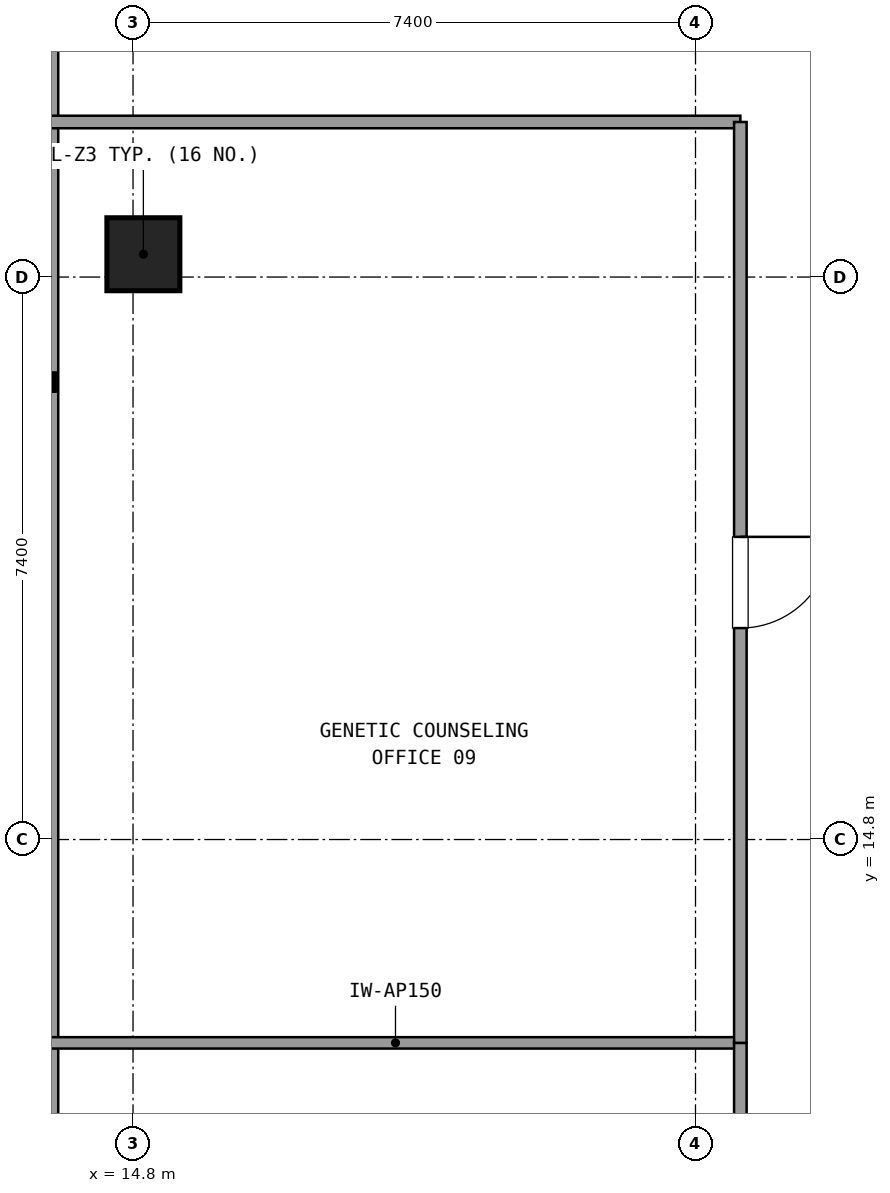
"""IFC4 building model, lengths in metres.
Left out: names, types, materials, properties, quantities, classifications, styles, units other than length and angle.
Written with IfcOpenShell. Run it as: python <this file> out.ifc"""

import sys

from ifc_helpers import new_model, si_unit, direction, frame, frame_2d, origin, origin_2d, place, context, subcontext, project, spatial, rectangle, extrude, element, fill, save


model = new_model("IFC4")
c1 = context("Model", 3, precision=1e-05, world=origin(), true_north=direction((0.0, 1.0)))
c2 = subcontext(c1, "Body", "Model", "MODEL_VIEW")
j1 = project(units=[si_unit("LENGTHUNIT", "METRE"), si_unit("PLANEANGLEUNIT", "RADIAN")], contexts=[c1])
p1 = place(None, origin())
s1 = spatial("IfcSite", under=j1, at=p1, CompositionType="ELEMENT")
p2 = place(p1, origin())
s2 = spatial("IfcBuilding", under=s1, at=p2, CompositionType="ELEMENT")
p3 = place(p2, frame((0.0, 0.0, 160.02)))
s3 = spatial("IfcBuildingStorey", under=s2, at=p3, CompositionType="ELEMENT", Elevation=160.02)
p4 = place(p3, frame((14.936, 22.5, 0.0), z_axis=(0.0, 0.0, 1.0), x_axis=(1.0, 0.0, 0.0)))
e1 = element("IfcColumn", 1, at=p4, inside=s3, PredefinedType="COLUMN", context=c2, shape_type="SweptSolid", body=[
    extrude(rectangle(XDim=0.96, YDim=0.96, at=origin_2d()), origin(), (0.0, 0.0, 1.0), 3.6),
])
p5 = place(p3, frame((13.696, 41.145, 0.0), z_axis=(0.0, 0.0, 1.0), x_axis=(0.0, -1.0, 0.0)))
e2 = element("IfcWall", 2, at=p5, inside=s3, PredefinedType="SOLIDWALL", context=c2, shape_type="SweptSolid", body=[
    extrude(rectangle(XDim=30.49, YDim=0.24, at=frame_2d((15.245, 0.0))), origin(), (0.0, 0.0, 1.0), 0.85),
])
p6 = place(p3, frame((13.716, 24.24, 0.0), z_axis=(0.0, 0.0, 1.0), x_axis=(1.0, 0.0, 0.0)))
e3 = element("IfcWall", 3, at=p6, inside=s3, PredefinedType="PARTITIONING", context=c2, shape_type="SweptSolid", body=[
    extrude(rectangle(XDim=9.074, YDim=0.165, at=frame_2d((4.537, 0.0))), origin(), (0.0, 0.0, 1.0), 2.61),
])
p7 = place(p3, frame((22.79, 12.125, 0.0), z_axis=(0.0, 0.0, 1.0), x_axis=(-1.0, 0.0, 0.0)))
e4 = element("IfcWall", 4, at=p7, inside=s3, PredefinedType="PARTITIONING", context=c2, shape_type="SweptSolid", body=[
    extrude(rectangle(XDim=9.074, YDim=0.15, at=frame_2d((4.537, 0.0))), origin(), (0.0, 0.0, 1.0), 2.61),
])
p8 = place(p3, frame((22.79, 4.7, 0.0), z_axis=(0.0, 0.0, 1.0), x_axis=(0.0, 1.0, 0.0)))
e5 = element("IfcWall", 5, at=p8, inside=s3, PredefinedType="PARTITIONING", context=c2, shape_type="SweptSolid", body=[
    extrude(rectangle(XDim=7.425, YDim=0.165, at=frame_2d((3.712, 0.0))), origin(), (0.0, 0.0, 1.0), 2.61),
])
p9 = place(p8, frame((3.112, 0.0, 0.0)))
e6 = element("IfcOpeningElement", 6, at=p9, cuts=e5, PredefinedType="OPENING", context=c2, shape_type="SweptSolid", body=[
    extrude(rectangle(XDim=1.2, YDim=2.15, at=frame_2d((0.6, 1.075))), frame((0.0, 0.093, 0.0), z_axis=(0.0, -1.0, 0.0), x_axis=(1.0, 0.0, 0.0)), (0.0, 0.0, 1.0), 0.185),
])
p10 = place(p3, frame((22.79, 12.125, 0.0), z_axis=(0.0, 0.0, 1.0), x_axis=(0.0, 1.0, 0.0)))
e7 = element("IfcWall", 7, at=p10, inside=s3, PredefinedType="PARTITIONING", context=c2, shape_type="SweptSolid", body=[
    extrude(rectangle(XDim=12.115, YDim=0.165, at=frame_2d((6.058, 0.0))), origin(), (0.0, 0.0, 1.0), 2.61),
])
p11 = place(p10, frame((5.457, 0.0, 0.0)))
e8 = element("IfcOpeningElement", 8, at=p11, cuts=e7, PredefinedType="OPENING", context=c2, shape_type="SweptSolid", body=[
    extrude(rectangle(XDim=1.2, YDim=2.15, at=frame_2d((0.6, 1.075))), frame((0.0, 0.093, 0.0), z_axis=(0.0, -1.0, 0.0), x_axis=(1.0, 0.0, 0.0)), (0.0, 0.0, 1.0), 0.185),
])
p12 = place(p11, frame((1.2, 0.0, 0.0), z_axis=(0.0, 0.0, 1.0), x_axis=(-1.0, 0.0, 0.0)))
e9 = element("IfcDoor", 9, at=p12, inside=s3, OperationType="SINGLE_SWING_RIGHT", PredefinedType="DOOR", context=c2, shape_type="SweptSolid", body=[
    extrude(rectangle(XDim=1.2, YDim=2.15, at=frame_2d((0.6, 1.075))), frame((0.0, 0.025, 0.0), z_axis=(0.0, -1.0, 0.0), x_axis=(1.0, 0.0, 0.0)), (0.0, 0.0, 1.0), 0.05),
])
fill(e8, e9)
save(model, sys.argv[1])
